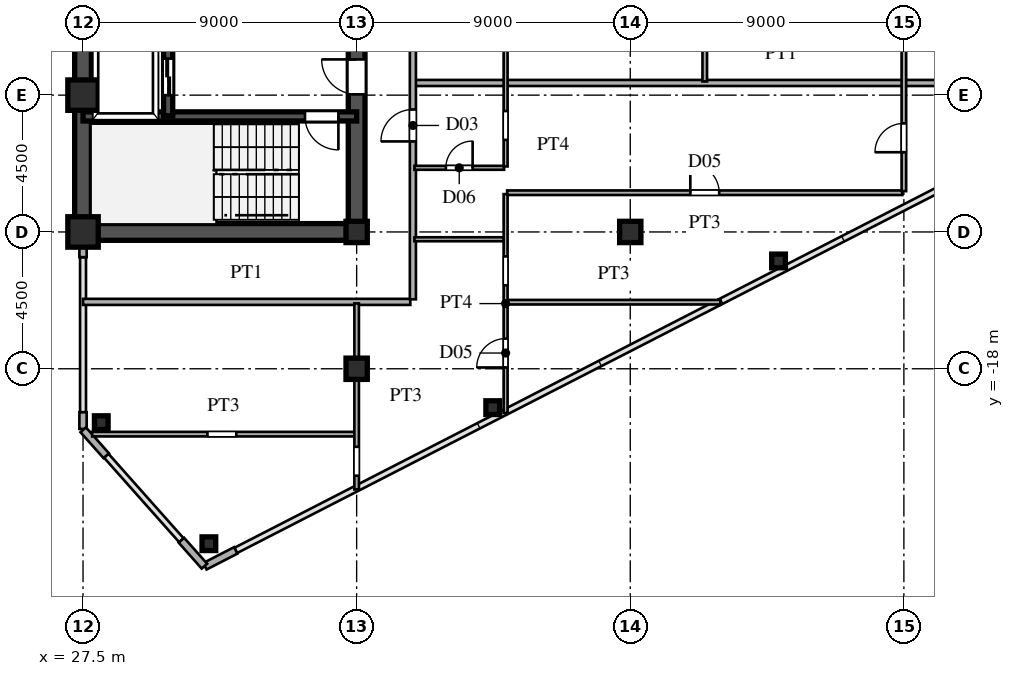
"""IFC4 building model, lengths in metres.
Left out: names, types, materials, properties, quantities, classifications, styles, units other than length and angle.
Written with IfcOpenShell. Run it as: python <this file> out.ifc"""

import sys

from ifc_helpers import new_model, si_unit, direction, frame, frame_2d, origin, origin_2d, place, context, subcontext, project, spatial, rectangle, hollow_rectangle, i_section, extrude, source, transform, mapped, element, fill, save


model = new_model("IFC4")
c1 = context("Model", 3, precision=1e-05, world=origin(), true_north=direction((0.0, 1.0)))
c2 = subcontext(c1, "Body", "Model", "MODEL_VIEW")
j1 = project(units=[si_unit("LENGTHUNIT", "METRE"), si_unit("PLANEANGLEUNIT", "RADIAN")], contexts=[c1])
p1 = place(None, origin())
s1 = spatial("IfcSite", under=j1, at=p1, CompositionType="ELEMENT")
p2 = place(p1, origin())
s2 = spatial("IfcBuilding", under=s1, at=p2, CompositionType="ELEMENT")
p3 = place(p2, frame((0.0, 0.0, 154.8)))
s3 = spatial("IfcBuildingStorey", under=s2, at=p3, CompositionType="ELEMENT", Elevation=154.8)
m1 = source(origin(), c2, "Body", "SweptSolid", [
    extrude(hollow_rectangle(XDim=1.0, YDim=1.0, WallThickness=0.042, at=origin_2d()), origin(), (0.0, 0.0, 1.0), 3.6),
])
for number, where, z_axis, x_axis in (
    (1, (27.5, -13.5, 0.0), (0.0, 0.0, 1.0), (1.0, 0.0, 0.0)),
    (2, (27.5, -9.0, 0.0), (0.0, 0.0, 1.0), (1.0, 0.0, 0.0)),
):
    element("IfcColumn", number, at=place(p3, frame(where, z_axis=z_axis, x_axis=x_axis)), inside=s3, PredefinedType="COLUMN", context=c2, shape_type="MappedRepresentation", body=[
        mapped(m1, transform((0.0, 0.0, 0.0), scale=1.0)),
    ])
m2 = source(origin(), c2, "Body", "SweptSolid", [
    extrude(i_section(OverallWidth=0.7, OverallDepth=0.7, WebThickness=0.028, FlangeThickness=0.045, at=origin_2d()), origin(), (0.0, 0.0, 1.0), 3.6),
])
for number, where, z_axis, x_axis in (
    (3, (36.5, -18.0, 0.0), (0.0, 0.0, 1.0), (1.0, 0.0, 0.0)),
    (4, (36.5, -13.5, 0.0), (0.0, 0.0, 1.0), (1.0, 0.0, 0.0)),
    (5, (45.5, -13.5, 0.0), (0.0, 0.0, 1.0), (1.0, 0.0, 0.0)),
):
    element("IfcColumn", number, at=place(p3, frame(where, z_axis=z_axis, x_axis=x_axis)), inside=s3, PredefinedType="COLUMN", context=c2, shape_type="MappedRepresentation", body=[
        mapped(m2, transform((0.0, 0.0, 0.0), scale=1.0)),
    ])
m3 = source(origin(), c2, "Body", "SweptSolid", [
    extrude(hollow_rectangle(XDim=0.45, YDim=0.45, WallThickness=0.018, at=origin_2d()), origin(), (0.0, 0.0, 1.0), 3.6),
])
for number, where, z_axis, x_axis in (
    (6, (31.64, -23.754, 0.0), (0.0, 0.0, 1.0), (1.0, 0.0, 0.0)),
    (7, (28.1, -19.772, 0.0), (0.0, 0.0, 1.0), (1.0, 0.0, 0.0)),
    (8, (40.976, -19.278, 0.0), (0.0, 0.0, 1.0), (1.0, 0.0, 0.0)),
    (9, (50.377, -14.453, 0.0), (0.0, 0.0, 1.0), (1.0, 0.0, 0.0)),
):
    element("IfcColumn", number, at=place(p3, frame(where, z_axis=z_axis, x_axis=x_axis)), inside=s3, PredefinedType="COLUMN", context=c2, shape_type="MappedRepresentation", body=[
        mapped(m3, transform((0.0, 0.0, 0.0), scale=1.0)),
    ])
p4 = place(p3, frame((31.509, -24.495, 0.0), z_axis=(0.0, 0.0, 1.0), x_axis=(0.889797395748, 0.456355776255, 0.0)))
e10 = element("IfcWall", 10, at=p4, inside=s3, PredefinedType="SOLIDWALL", context=c2, shape_type="SweptSolid", body=[
    extrude(rectangle(XDim=1.14, YDim=0.24, at=frame_2d((0.57, 0.0))), origin(), (0.0, 0.0, 1.0), 3.38),
])
p5 = place(p3, frame((27.5, -19.98, 0.0), z_axis=(0.0, 0.0, 1.0), x_axis=(0.0, 1.0, 0.0)))
e11 = element("IfcWall", 11, at=p5, inside=s3, PredefinedType="SOLIDWALL", context=c2, shape_type="SweptSolid", body=[
    extrude(rectangle(XDim=0.55, YDim=0.24, at=frame_2d((0.275, 0.0))), origin(), (0.0, 0.0, 1.0), 3.38),
])
p6 = place(p3, frame((27.5, -14.33, 0.0), z_axis=(0.0, 0.0, 1.0), x_axis=(0.0, 1.0, 0.0)))
e12 = element("IfcWall", 12, at=p6, inside=s3, PredefinedType="SOLIDWALL", context=c2, shape_type="SweptSolid", body=[
    extrude(rectangle(XDim=0.55, YDim=0.24, at=frame_2d((0.275, 0.0))), origin(), (0.0, 0.0, 1.0), 1.88),
])
for number, where, z_axis, x_axis in (
    (13, (27.507, -20.008, 0.0), (0.0, 0.0, 1.0), (0.664, -0.747, 0.0)),
    (14, (30.736, -23.64, 0.0), (0.0, 0.0, 1.0), (0.664, -0.747, 0.0)),
):
    element("IfcWall", number, at=place(p3, frame(where, z_axis=z_axis, x_axis=x_axis)), inside=s3, PredefinedType="SOLIDWALL", context=c2, shape_type="SweptSolid", body=[
        extrude(rectangle(XDim=1.14, YDim=0.24, at=frame_2d((0.57, 0.0))), origin(), (0.0, 0.0, 1.0), 3.38),
    ])
p7 = place(p3, frame((27.5, -13.5, 0.0), z_axis=(0.0, 0.0, 1.0), x_axis=(0.0, 1.0, 0.0)))
e15 = element("IfcWall", 15, at=p7, inside=s3, PredefinedType="SHEAR", context=c2, shape_type="SweptSolid", body=[
    extrude(rectangle(XDim=12.2, YDim=0.55, at=frame_2d((6.1, 0.0))), origin(), (0.0, 0.0, 1.0), 3.38),
])
p8 = place(p3, frame((27.5, -13.5, 0.0), z_axis=(0.0, 0.0, 1.0), x_axis=(1.0, 0.0, 0.0)))
e16 = element("IfcWall", 16, at=p8, inside=s3, PredefinedType="SHEAR", context=c2, shape_type="SweptSolid", body=[
    extrude(rectangle(XDim=9.0, YDim=0.55, at=frame_2d((4.5, 0.0))), origin(), (0.0, 0.0, 1.0), 3.38),
])
p9 = place(p3, frame((36.5, -13.65, 0.0), z_axis=(0.0, 0.0, 1.0), x_axis=(0.0, 1.0, 0.0)))
e17 = element("IfcWall", 17, at=p9, inside=s3, PredefinedType="SHEAR", context=c2, shape_type="SweptSolid", body=[
    extrude(rectangle(XDim=7.15, YDim=0.55, at=frame_2d((3.575, 0.0))), origin(), (0.0, 0.0, 1.0), 3.38),
])
p10 = place(p9, frame((4.675, 0.0, 0.0)))
e18 = element("IfcOpeningElement", 18, at=p10, cuts=e17, PredefinedType="OPENING", context=c2, shape_type="SweptSolid", body=[
    extrude(rectangle(XDim=1.15, YDim=2.2, at=frame_2d((0.575, 1.1))), frame((0.0, 0.285, 0.0), z_axis=(0.0, -1.0, 0.0), x_axis=(1.0, 0.0, 0.0)), (0.0, 0.0, 1.0), 0.57),
])
p11 = place(p3, frame((27.5, -9.7, 0.0), z_axis=(0.0, 0.0, 1.0), x_axis=(1.0, 0.0, 0.0)))
e19 = element("IfcWall", 19, at=p11, inside=s3, PredefinedType="SHEAR", context=c2, shape_type="SweptSolid", body=[
    extrude(rectangle(XDim=9.0, YDim=0.3, at=frame_2d((4.5, 0.0))), origin(), (0.0, 0.0, 1.0), 3.38),
])
p12 = place(p11, frame((7.3, 0.0, 0.0)))
e20 = element("IfcOpeningElement", 20, at=p12, cuts=e19, PredefinedType="OPENING", context=c2, shape_type="SweptSolid", body=[
    extrude(rectangle(XDim=1.1, YDim=2.2, at=frame_2d((0.55, 1.1))), frame((0.0, 0.16, 0.0), z_axis=(0.0, -1.0, 0.0), x_axis=(1.0, 0.0, 0.0)), (0.0, 0.0, 1.0), 0.32),
])
p13 = place(p3, frame((30.3, -9.68, 0.0), z_axis=(0.0, 0.0, 1.0), x_axis=(0.0, 1.0, 0.0)))
e21 = element("IfcWall", 21, at=p13, inside=s3, PredefinedType="SHEAR", context=c2, shape_type="SweptSolid", body=[
    extrude(rectangle(XDim=2.56, YDim=0.3, at=frame_2d((1.28, 0.0))), origin(), (0.0, 0.0, 1.0), 3.38),
])
p14 = place(p13, frame((0.68, 0.0, 0.0)))
e22 = element("IfcOpeningElement", 22, at=p14, cuts=e21, PredefinedType="OPENING", context=c2, shape_type="SweptSolid", body=[
    extrude(rectangle(XDim=1.2, YDim=2.25, at=frame_2d((0.6, 1.125))), frame((0.0, 0.16, 0.0), z_axis=(0.0, -1.0, 0.0), x_axis=(1.0, 0.0, 0.0)), (0.0, 0.0, 1.0), 0.32),
])
p15 = place(p3, frame((27.801, -20.15, 0.0), z_axis=(0.0, 0.0, 1.0), x_axis=(1.0, 0.0, 0.0)))
e23 = element("IfcWall", 23, at=p15, inside=s3, PredefinedType="PARTITIONING", context=c2, shape_type="SweptSolid", body=[
    extrude(rectangle(XDim=8.649, YDim=0.15, at=frame_2d((4.325, 0.0))), origin(), (0.0, 0.0, 1.0), 3.38),
])
p16 = place(p15, frame((3.791, 0.0, 0.0)))
e24 = element("IfcOpeningElement", 24, at=p16, cuts=e23, PredefinedType="OPENING", context=c2, shape_type="SweptSolid", body=[
    extrude(rectangle(XDim=0.95, YDim=2.15, at=frame_2d((0.475, 1.075))), frame((0.0, 0.085, 0.0), z_axis=(0.0, -1.0, 0.0), x_axis=(1.0, 0.0, 0.0)), (0.0, 0.0, 1.0), 0.17),
])
p17 = place(p3, frame((41.45, -15.81, 0.0), z_axis=(0.0, 0.0, 1.0), x_axis=(1.0, 0.0, 0.0)))
e25 = element("IfcWall", 25, at=p17, inside=s3, PredefinedType="PARTITIONING", context=c2, shape_type="SweptSolid", body=[
    extrude(rectangle(XDim=7.013, YDim=0.15, at=frame_2d((3.506, 0.0))), origin(), (0.0, 0.0, 1.0), 3.38),
])
p18 = place(p3, frame((27.5, -15.8, 0.0), z_axis=(0.0, 0.0, 1.0), x_axis=(1.0, 0.0, 0.0)))
e26 = element("IfcWall", 26, at=p18, inside=s3, PredefinedType="PARTITIONING", context=c2, shape_type="SweptSolid", body=[
    extrude(rectangle(XDim=10.765, YDim=0.2, at=frame_2d((5.382, 0.0))), origin(), (0.0, 0.0, 1.0), 3.38),
])
p19 = place(p3, frame((38.4, -13.74, 0.0), z_axis=(0.0, 0.0, 1.0), x_axis=(1.0, 0.0, 0.0)))
e27 = element("IfcWall", 27, at=p19, inside=s3, PredefinedType="PARTITIONING", context=c2, shape_type="SweptSolid", body=[
    extrude(rectangle(XDim=2.95, YDim=0.13, at=frame_2d((1.475, 0.0))), origin(), (0.0, 0.0, 1.0), 3.38),
])
p20 = place(p3, frame((41.45, -12.21, 0.0), z_axis=(0.0, 0.0, 1.0), x_axis=(1.0, 0.0, 0.0)))
e28 = element("IfcWall", 28, at=p20, inside=s3, PredefinedType="PARTITIONING", context=c2, shape_type="SweptSolid", body=[
    extrude(rectangle(XDim=13.0, YDim=0.15, at=frame_2d((6.5, 0.0))), origin(), (0.0, 0.0, 1.0), 3.38),
])
p21 = place(p20, frame((6.025, 0.0, 0.0)))
e29 = element("IfcOpeningElement", 29, at=p21, cuts=e28, PredefinedType="OPENING", context=c2, shape_type="SweptSolid", body=[
    extrude(rectangle(XDim=0.95, YDim=2.15, at=frame_2d((0.475, 1.075))), frame((0.0, 0.085, 0.0), z_axis=(0.0, -1.0, 0.0), x_axis=(1.0, 0.0, 0.0)), (0.0, 0.0, 1.0), 0.17),
])
p22 = place(p3, frame((38.4, -11.39, 0.0), z_axis=(0.0, 0.0, 1.0), x_axis=(1.0, 0.0, 0.0)))
e30 = element("IfcWall", 30, at=p22, inside=s3, PredefinedType="PARTITIONING", context=c2, shape_type="SweptSolid", body=[
    extrude(rectangle(XDim=2.95, YDim=0.13, at=frame_2d((1.475, 0.0))), origin(), (0.0, 0.0, 1.0), 3.38),
])
p23 = place(p22, frame((1.035, 0.0, 0.0)))
e31 = element("IfcOpeningElement", 31, at=p23, cuts=e30, PredefinedType="OPENING", context=c2, shape_type="SweptSolid", body=[
    extrude(rectangle(XDim=0.88, YDim=2.1, at=frame_2d((0.44, 1.05))), frame((0.0, 0.075, 0.0), z_axis=(0.0, -1.0, 0.0), x_axis=(1.0, 0.0, 0.0)), (0.0, 0.0, 1.0), 0.15),
])
p24 = place(p3, frame((38.43, -8.6, 0.0), z_axis=(0.0, 0.0, 1.0), x_axis=(1.0, 0.0, 0.0)))
e32 = element("IfcWall", 32, at=p24, inside=s3, PredefinedType="PARTITIONING", context=c2, shape_type="SweptSolid", body=[
    extrude(rectangle(XDim=24.066, YDim=0.2, at=frame_2d((12.033, 0.0))), origin(), (0.0, 0.0, 1.0), 3.38),
])
p25 = place(p3, frame((36.5, -21.969, 0.0), z_axis=(0.0, 0.0, 1.0), x_axis=(0.0, 1.0, 0.0)))
e33 = element("IfcWall", 33, at=p25, inside=s3, PredefinedType="PARTITIONING", context=c2, shape_type="SweptSolid", body=[
    extrude(rectangle(XDim=3.949, YDim=0.15, at=frame_2d((1.975, 0.0))), origin(), (0.0, 0.0, 1.0), 3.38),
])
p26 = place(p25, frame((0.452, 0.0, 0.0)))
e34 = element("IfcOpeningElement", 34, at=p26, cuts=e33, PredefinedType="OPENING", context=c2, shape_type="SweptSolid", body=[
    extrude(rectangle(XDim=0.95, YDim=2.15, at=frame_2d((0.475, 1.075))), frame((0.0, 0.085, 0.0), z_axis=(0.0, -1.0, 0.0), x_axis=(1.0, 0.0, 0.0)), (0.0, 0.0, 1.0), 0.17),
])
p27 = place(p3, frame((36.5, -18.02, 0.0), z_axis=(0.0, 0.0, 1.0), x_axis=(0.0, 1.0, 0.0)))
e35 = element("IfcWall", 35, at=p27, inside=s3, PredefinedType="PARTITIONING", context=c2, shape_type="SweptSolid", body=[
    extrude(rectangle(XDim=2.17, YDim=0.15, at=frame_2d((1.085, 0.0))), origin(), (0.0, 0.0, 1.0), 1.38),
])
p28 = place(p3, frame((38.35, -15.715, 0.0), z_axis=(0.0, 0.0, 1.0), x_axis=(0.0, 1.0, 0.0)))
e36 = element("IfcWall", 36, at=p28, inside=s3, PredefinedType="PARTITIONING", context=c2, shape_type="SweptSolid", body=[
    extrude(rectangle(XDim=31.43, YDim=0.2, at=frame_2d((15.715, 0.0))), origin(), (0.0, 0.0, 1.0), 3.38),
])
p29 = place(p28, frame((5.192, 0.0, 0.0)))
e37 = element("IfcOpeningElement", 37, at=p29, cuts=e36, PredefinedType="OPENING", context=c2, shape_type="SweptSolid", body=[
    extrude(rectangle(XDim=1.05, YDim=2.25, at=frame_2d((0.525, 1.125))), frame((0.0, 0.11, 0.0), z_axis=(0.0, -1.0, 0.0), x_axis=(1.0, 0.0, 0.0)), (0.0, 0.0, 1.0), 0.22),
])
p30 = place(p28, frame((12.895, 0.0, 0.0)))
e38 = element("IfcOpeningElement", 38, at=p30, cuts=e36, PredefinedType="OPENING", context=c2, shape_type="SweptSolid", body=[
    extrude(rectangle(XDim=1.05, YDim=2.25, at=frame_2d((0.525, 1.125))), frame((0.0, 0.11, 0.0), z_axis=(0.0, -1.0, 0.0), x_axis=(1.0, 0.0, 0.0)), (0.0, 0.0, 1.0), 0.22),
])
p31 = place(p28, frame((20.988, 0.0, 0.0)))
e39 = element("IfcOpeningElement", 39, at=p31, cuts=e36, PredefinedType="OPENING", context=c2, shape_type="SweptSolid", body=[
    extrude(rectangle(XDim=1.05, YDim=2.25, at=frame_2d((0.525, 1.125))), frame((0.0, 0.11, 0.0), z_axis=(0.0, -1.0, 0.0), x_axis=(1.0, 0.0, 0.0)), (0.0, 0.0, 1.0), 0.22),
])
p32 = place(p3, frame((41.4, -19.455, 0.0), z_axis=(0.0, 0.0, 1.0), x_axis=(0.0, 1.0, 0.0)))
e40 = element("IfcWall", 40, at=p32, inside=s3, PredefinedType="PARTITIONING", context=c2, shape_type="SweptSolid", body=[
    extrude(rectangle(XDim=7.198, YDim=0.13, at=frame_2d((3.599, 0.0))), origin(), (0.0, 0.0, 1.0), 3.38),
])
p33 = place(p32, frame((4.201, 0.0, 0.0)))
e41 = element("IfcOpeningElement", 41, at=p33, cuts=e40, PredefinedType="OPENING", context=c2, shape_type="SweptSolid", body=[
    extrude(rectangle(XDim=0.95, YDim=2.15, at=frame_2d((0.475, 1.075))), frame((0.0, 0.075, 0.0), z_axis=(0.0, -1.0, 0.0), x_axis=(1.0, 0.0, 0.0)), (0.0, 0.0, 1.0), 0.15),
])
p34 = place(p32, frame((1.498, 0.0, 0.0)))
e42 = element("IfcOpeningElement", 42, at=p34, cuts=e40, PredefinedType="OPENING", context=c2, shape_type="SweptSolid", body=[
    extrude(rectangle(XDim=0.95, YDim=2.15, at=frame_2d((0.475, 1.075))), frame((0.0, 0.075, 0.0), z_axis=(0.0, -1.0, 0.0), x_axis=(1.0, 0.0, 0.0)), (0.0, 0.0, 1.0), 0.15),
])
p35 = place(p3, frame((41.4, -11.345, 0.0), z_axis=(0.0, 0.0, 1.0), x_axis=(0.0, 1.0, 0.0)))
e43 = element("IfcWall", 43, at=p35, inside=s3, PredefinedType="PARTITIONING", context=c2, shape_type="SweptSolid", body=[
    extrude(rectangle(XDim=6.203, YDim=0.13, at=frame_2d((3.102, 0.0))), origin(), (0.0, 0.0, 1.0), 3.38),
])
p36 = place(p35, frame((0.873, 0.0, 0.0)))
e44 = element("IfcOpeningElement", 44, at=p36, cuts=e43, PredefinedType="OPENING", context=c2, shape_type="SweptSolid", body=[
    extrude(rectangle(XDim=0.95, YDim=2.15, at=frame_2d((0.475, 1.075))), frame((0.0, 0.075, 0.0), z_axis=(0.0, -1.0, 0.0), x_axis=(1.0, 0.0, 0.0)), (0.0, 0.0, 1.0), 0.15),
])
p37 = place(p3, frame((47.95, -8.55, 0.0), z_axis=(0.0, 0.0, 1.0), x_axis=(0.0, 1.0, 0.0)))
e45 = element("IfcWall", 45, at=p37, inside=s3, PredefinedType="PARTITIONING", context=c2, shape_type="SweptSolid", body=[
    extrude(rectangle(XDim=22.913, YDim=0.15, at=frame_2d((11.457, 0.0))), origin(), (0.0, 0.0, 1.0), 3.38),
])
p38 = place(p37, frame((5.975, 0.0, 0.0)))
e46 = element("IfcOpeningElement", 46, at=p38, cuts=e45, PredefinedType="OPENING", context=c2, shape_type="SweptSolid", body=[
    extrude(rectangle(XDim=0.95, YDim=2.15, at=frame_2d((0.475, 1.075))), frame((0.0, 0.085, 0.0), z_axis=(0.0, -1.0, 0.0), x_axis=(1.0, 0.0, 0.0)), (0.0, 0.0, 1.0), 0.17),
])
p39 = place(p37, frame((1.642, 0.0, 0.0)))
e47 = element("IfcOpeningElement", 47, at=p39, cuts=e45, PredefinedType="OPENING", context=c2, shape_type="SweptSolid", body=[
    extrude(rectangle(XDim=0.95, YDim=2.15, at=frame_2d((0.475, 1.075))), frame((0.0, 0.085, 0.0), z_axis=(0.0, -1.0, 0.0), x_axis=(1.0, 0.0, 0.0)), (0.0, 0.0, 1.0), 0.17),
])
p40 = place(p37, frame((14.978, 0.0, 0.0)))
e48 = element("IfcOpeningElement", 48, at=p40, cuts=e45, PredefinedType="OPENING", context=c2, shape_type="SweptSolid", body=[
    extrude(rectangle(XDim=0.95, YDim=2.15, at=frame_2d((0.475, 1.075))), frame((0.0, 0.085, 0.0), z_axis=(0.0, -1.0, 0.0), x_axis=(1.0, 0.0, 0.0)), (0.0, 0.0, 1.0), 0.17),
])
p41 = place(p3, frame((54.5, -12.157, 0.0), z_axis=(0.0, 0.0, 1.0), x_axis=(0.0, 1.0, 0.0)))
e49 = element("IfcWall", 49, at=p41, inside=s3, PredefinedType="PARTITIONING", context=c2, shape_type="SweptSolid", body=[
    extrude(rectangle(XDim=24.889, YDim=0.15, at=frame_2d((12.444, 0.0))), origin(), (0.0, 0.0, 1.0), 2.78),
])
p42 = place(p41, frame((1.279, 0.0, 0.0)))
e50 = element("IfcOpeningElement", 50, at=p42, cuts=e49, PredefinedType="OPENING", context=c2, shape_type="SweptSolid", body=[
    extrude(rectangle(XDim=0.95, YDim=2.15, at=frame_2d((0.475, 1.075))), frame((0.0, 0.085, 0.0), z_axis=(0.0, -1.0, 0.0), x_axis=(1.0, 0.0, 0.0)), (0.0, 0.0, 1.0), 0.17),
])
p43 = place(p41, frame((9.582, 0.0, 0.0)))
e51 = element("IfcOpeningElement", 51, at=p43, cuts=e49, PredefinedType="OPENING", context=c2, shape_type="SweptSolid", body=[
    extrude(rectangle(XDim=0.95, YDim=2.15, at=frame_2d((0.475, 1.075))), frame((0.0, 0.085, 0.0), z_axis=(0.0, -1.0, 0.0), x_axis=(1.0, 0.0, 0.0)), (0.0, 0.0, 1.0), 0.17),
])
p44 = place(p41, frame((13.915, 0.0, 0.0)))
e52 = element("IfcOpeningElement", 52, at=p44, cuts=e49, PredefinedType="OPENING", context=c2, shape_type="SweptSolid", body=[
    extrude(rectangle(XDim=0.95, YDim=2.15, at=frame_2d((0.475, 1.075))), frame((0.0, 0.085, 0.0), z_axis=(0.0, -1.0, 0.0), x_axis=(1.0, 0.0, 0.0)), (0.0, 0.0, 1.0), 0.17),
])
p45 = place(p41, frame((18.585, 0.0, 0.0)))
e53 = element("IfcOpeningElement", 53, at=p45, cuts=e49, PredefinedType="OPENING", context=c2, shape_type="SweptSolid", body=[
    extrude(rectangle(XDim=0.95, YDim=2.15, at=frame_2d((0.475, 1.075))), frame((0.0, 0.085, 0.0), z_axis=(0.0, -1.0, 0.0), x_axis=(1.0, 0.0, 0.0)), (0.0, 0.0, 1.0), 0.17),
])
m4 = source(origin(), c2, "Body", "SweptSolid", [
    extrude(rectangle(XDim=1.15, YDim=2.2, at=frame_2d((0.575, 1.1))), frame((0.0, 0.025, 0.0), z_axis=(0.0, -1.0, 0.0), x_axis=(1.0, 0.0, 0.0)), (0.0, 0.0, 1.0), 0.05),
])
p46 = place(p10, origin())
e54 = element("IfcDoor", 54, at=p46, inside=s3, OperationType="SINGLE_SWING_RIGHT", PredefinedType="DOOR", context=c2, shape_type="MappedRepresentation", body=[
    mapped(m4, transform((0.0, 0.0, 0.0), scale=1.0)),
])
fill(e18, e54)
m5 = source(origin(), c2, "Body", "SweptSolid", [
    extrude(rectangle(XDim=1.1, YDim=2.2, at=frame_2d((0.55, 1.1))), frame((0.0, 0.025, 0.0), z_axis=(0.0, -1.0, 0.0), x_axis=(1.0, 0.0, 0.0)), (0.0, 0.0, 1.0), 0.05),
])
p47 = place(p12, frame((1.1, 0.0, 0.0), z_axis=(0.0, 0.0, 1.0), x_axis=(-1.0, 0.0, 0.0)))
e55 = element("IfcDoor", 55, at=p47, inside=s3, OperationType="SINGLE_SWING_RIGHT", PredefinedType="DOOR", context=c2, shape_type="MappedRepresentation", body=[
    mapped(m5, transform((0.0, 0.0, 0.0), scale=1.0)),
])
fill(e20, e55)
m6 = source(origin(), c2, "Body", "SweptSolid", [
    extrude(rectangle(XDim=1.2, YDim=2.25, at=frame_2d((0.6, 1.125))), frame((0.0, 0.025, 0.0), z_axis=(0.0, -1.0, 0.0), x_axis=(1.0, 0.0, 0.0)), (0.0, 0.0, 1.0), 0.05),
])
p48 = place(p14, origin())
e56 = element("IfcDoor", 56, at=p48, inside=s3, OperationType="DOUBLE_DOOR_SLIDING", PredefinedType="DOOR", context=c2, shape_type="MappedRepresentation", body=[
    mapped(m6, transform((0.0, 0.0, 0.0), scale=1.0)),
])
fill(e22, e56)
m7 = source(origin(), c2, "Body", "SweptSolid", [
    extrude(rectangle(XDim=0.95, YDim=2.15, at=frame_2d((0.475, 1.075))), frame((0.0, 0.025, 0.0), z_axis=(0.0, -1.0, 0.0), x_axis=(1.0, 0.0, 0.0)), (0.0, 0.0, 1.0), 0.05),
])
p49 = place(p21, origin())
e57 = element("IfcDoor", 57, at=p49, inside=s3, OperationType="SINGLE_SWING_LEFT", PredefinedType="DOOR", context=c2, shape_type="MappedRepresentation", body=[
    mapped(m7, transform((0.0, 0.0, 0.0), scale=1.0)),
])
fill(e29, e57)
m8 = source(origin(), c2, "Body", "SweptSolid", [
    extrude(rectangle(XDim=0.88, YDim=2.1, at=frame_2d((0.44, 1.05))), frame((0.0, 0.025, 0.0), z_axis=(0.0, -1.0, 0.0), x_axis=(1.0, 0.0, 0.0)), (0.0, 0.0, 1.0), 0.05),
])
p50 = place(p23, origin())
e58 = element("IfcDoor", 58, at=p50, inside=s3, OperationType="SINGLE_SWING_RIGHT", PredefinedType="DOOR", context=c2, shape_type="MappedRepresentation", body=[
    mapped(m8, transform((0.0, 0.0, 0.0), scale=1.0)),
])
fill(e31, e58)
m9 = source(origin(), c2, "Body", "SweptSolid", [
    extrude(rectangle(XDim=1.05, YDim=2.25, at=frame_2d((0.525, 1.125))), frame((0.0, 0.025, 0.0), z_axis=(0.0, -1.0, 0.0), x_axis=(1.0, 0.0, 0.0)), (0.0, 0.0, 1.0), 0.05),
])
p51 = place(p29, origin())
e59 = element("IfcDoor", 59, at=p51, inside=s3, OperationType="SINGLE_SWING_LEFT", PredefinedType="DOOR", context=c2, shape_type="MappedRepresentation", body=[
    mapped(m9, transform((0.0, 0.0, 0.0), scale=1.0)),
])
fill(e37, e59)
p52 = place(p34, origin())
e60 = element("IfcDoor", 60, at=p52, inside=s3, OperationType="SINGLE_SWING_LEFT", PredefinedType="DOOR", context=c2, shape_type="MappedRepresentation", body=[
    mapped(m7, transform((0.0, 0.0, 0.0), scale=1.0)),
])
fill(e42, e60)
p53 = place(p42, origin())
e61 = element("IfcDoor", 61, at=p53, inside=s3, OperationType="SINGLE_SWING_LEFT", PredefinedType="DOOR", context=c2, shape_type="MappedRepresentation", body=[
    mapped(m7, transform((0.0, 0.0, 0.0), scale=1.0)),
])
fill(e50, e61)
save(model, sys.argv[1])
